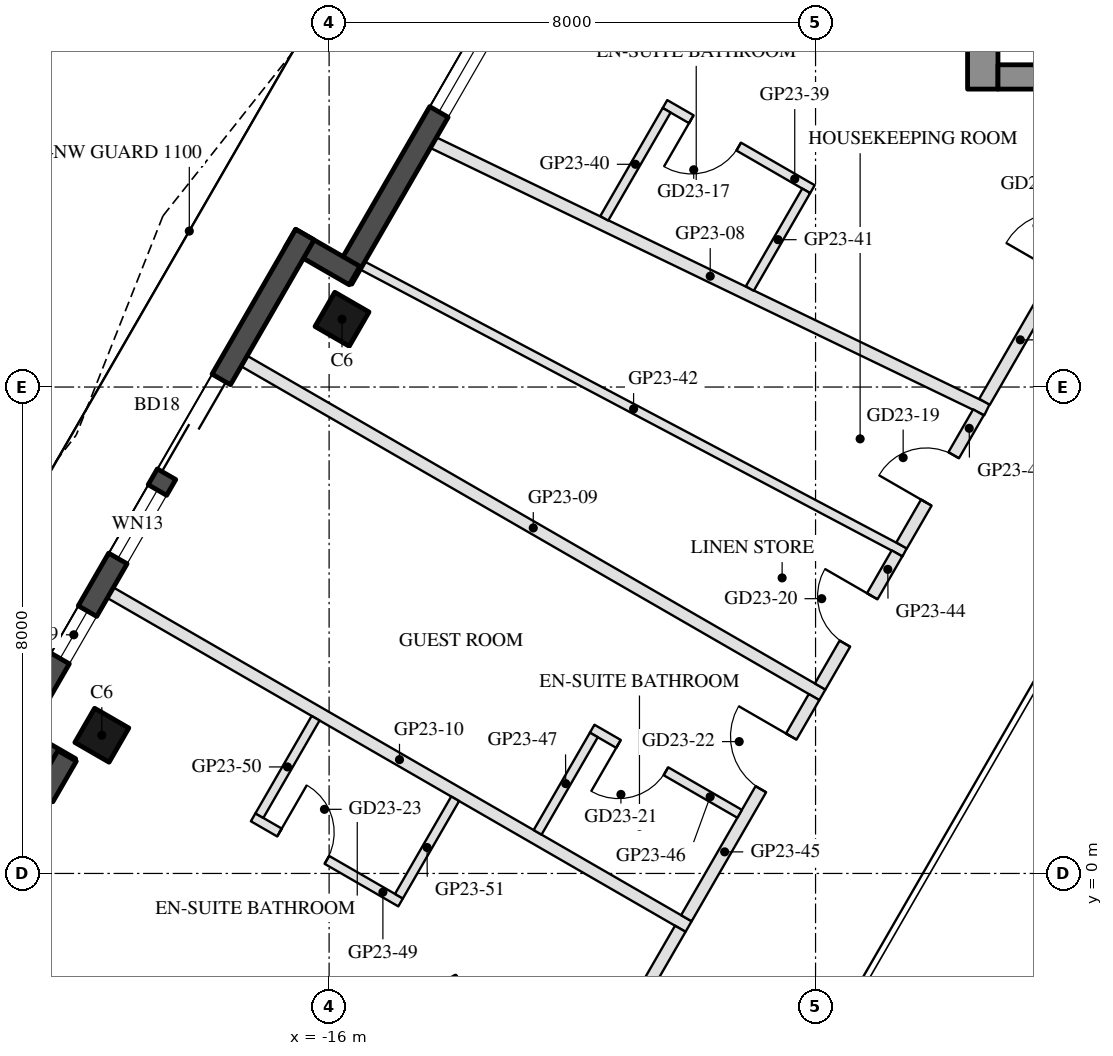
"""IFC4 building model, lengths in metres.
Left out: names, types, materials, properties, quantities, classifications, styles, units other than length and angle.
Written with IfcOpenShell. Run it as: python <this file> out.ifc"""

import sys

from ifc_helpers import new_model, si_unit, direction, frame, frame_2d, origin, origin_2d, place, context, subcontext, project, spatial, rectangle, hollow_rectangle, extrude, boolean, halfspace, element, fill, save


model = new_model("IFC4")
c1 = context("Model", 3, precision=1e-05, world=origin(), true_north=direction((0.0, 1.0)))
c2 = subcontext(c1, "Body", "Model", "MODEL_VIEW")
j1 = project(units=[si_unit("LENGTHUNIT", "METRE"), si_unit("PLANEANGLEUNIT", "RADIAN")], contexts=[c1])
p1 = place(None, origin())
s1 = spatial("IfcSite", under=j1, at=p1, CompositionType="ELEMENT")
p2 = place(p1, origin())
s2 = spatial("IfcBuilding", under=s1, at=p2, CompositionType="ELEMENT")
p3 = place(p2, frame((0.0, 0.0, 250.4)))
s3 = spatial("IfcBuildingStorey", under=s2, at=p3, CompositionType="ELEMENT", Elevation=250.4)
p4 = place(p3, frame((-15.788, 9.115, 0.0), z_axis=(0.0, 0.0, 1.0), x_axis=(0.5, 0.866025403784, 0.0)))
e1 = element("IfcColumn", 1, at=p4, inside=s3, PredefinedType="COLUMN", context=c2, shape_type="SweptSolid", body=[
    boolean("DIFFERENCE", extrude(hollow_rectangle(XDim=0.65, YDim=0.65, WallThickness=0.03, at=origin_2d()), origin(), (0.0, 0.0, 1.0), 3.7), halfspace(frame((0.0, 0.0, 3.663), z_axis=(0.0, 0.0, 1.0), x_axis=(1.0, 0.0, 0.0)), False)),
])
p5 = place(p3, frame((-19.738, 2.273, 0.0), z_axis=(0.0, 0.0, 1.0), x_axis=(0.5, 0.866025403784, 0.0)))
e2 = element("IfcColumn", 2, at=p5, inside=s3, PredefinedType="COLUMN", context=c2, shape_type="SweptSolid", body=[
    boolean("DIFFERENCE", extrude(hollow_rectangle(XDim=0.65, YDim=0.65, WallThickness=0.03, at=origin_2d()), origin(), (0.0, 0.0, 1.0), 3.7), halfspace(frame((0.0, 0.0, 3.66), z_axis=(0.0, 0.0, 1.0), x_axis=(1.0, 0.0, 0.0)), False)),
])
p6 = place(p3, frame((-12.409, 15.617, 0.0), z_axis=(0.0, 0.0, 1.0), x_axis=(-0.500003597184, -0.866023326939, 0.0)))
e3 = element("IfcWall", 3, at=p6, inside=s3, PredefinedType="SOLIDWALL", context=c2, shape_type="SweptSolid", body=[
    extrude(rectangle(XDim=6.74, YDim=0.35, at=frame_2d((3.37, 0.0))), origin(), (0.0, 0.0, 1.0), 3.55),
])
p7 = place(p6, frame((0.77, 0.0, 0.3)))
e4 = element("IfcOpeningElement", 4, at=p7, cuts=e3, PredefinedType="OPENING", context=c2, shape_type="SweptSolid", body=[
    extrude(rectangle(XDim=2.8, YDim=2.65, at=frame_2d((1.4, 1.325))), frame((0.0, 0.185, 0.0), z_axis=(0.0, -1.0, 0.0), x_axis=(1.0, 0.0, 0.0)), (0.0, 0.0, 1.0), 0.37),
])
p8 = place(p3, frame((-15.581, 9.833, 0.0), z_axis=(0.0, 0.0, 1.0), x_axis=(-0.866055662726, 0.499947586314, 0.0)))
e5 = element("IfcWall", 5, at=p8, inside=s3, PredefinedType="SOLIDWALL", context=c2, shape_type="SweptSolid", body=[
    extrude(rectangle(XDim=1.22, YDim=0.35, at=frame_2d((0.61, 0.0))), origin(), (0.0, 0.0, 1.0), 3.55),
])
p9 = place(p3, frame((-16.398, 10.507, 0.0), z_axis=(0.0, 0.0, 1.0), x_axis=(-0.499999142773, -0.866025898704, 0.0)))
e6 = element("IfcWall", 6, at=p9, inside=s3, PredefinedType="SOLIDWALL", context=c2, shape_type="SweptSolid", body=[
    extrude(rectangle(XDim=9.7, YDim=0.35, at=frame_2d((4.85, 0.0))), origin(), (0.0, 0.0, 1.0), 3.55),
])
p10 = place(p9, frame((2.75, 0.0, 0.0)))
e7 = element("IfcOpeningElement", 7, at=p10, cuts=e6, PredefinedType="OPENING", context=c2, shape_type="SweptSolid", body=[
    extrude(rectangle(XDim=1.8, YDim=2.4, at=frame_2d((0.9, 1.2))), frame((0.0, 0.185, 0.0), z_axis=(0.0, -1.0, 0.0), x_axis=(1.0, 0.0, 0.0)), (0.0, 0.0, 1.0), 0.37),
])
p11 = place(p9, frame((4.85, 0.0, 0.3)))
e8 = element("IfcOpeningElement", 8, at=p11, cuts=e6, PredefinedType="OPENING", context=c2, shape_type="SweptSolid", body=[
    extrude(rectangle(XDim=1.3, YDim=2.65, at=frame_2d((0.65, 1.325))), frame((0.0, 0.185, 0.0), z_axis=(0.0, -1.0, 0.0), x_axis=(1.0, 0.0, 0.0)), (0.0, 0.0, 1.0), 0.37),
])
p12 = place(p9, frame((7.15, 0.0, 0.3)))
e9 = element("IfcOpeningElement", 9, at=p12, cuts=e6, PredefinedType="OPENING", context=c2, shape_type="SweptSolid", body=[
    extrude(rectangle(XDim=0.9, YDim=2.65, at=frame_2d((0.45, 1.325))), frame((0.0, 0.185, 0.0), z_axis=(0.0, -1.0, 0.0), x_axis=(1.0, 0.0, 0.0)), (0.0, 0.0, 1.0), 0.37),
])
p13 = place(p3, frame((-21.312, 2.346, 0.0), z_axis=(0.0, 0.0, 1.0), x_axis=(0.866005645448, -0.500034220881, 0.0)))
e10 = element("IfcWall", 10, at=p13, inside=s3, PredefinedType="SOLIDWALL", context=c2, shape_type="SweptSolid", body=[
    extrude(rectangle(XDim=1.22, YDim=0.35, at=frame_2d((0.61, 0.0))), origin(), (0.0, 0.0, 1.0), 3.55),
])
p14 = place(p3, frame((-20.309, 1.934, 0.0), z_axis=(0.0, 0.0, 1.0), x_axis=(-0.499992114976, -0.866029956157, 0.0)))
e11 = element("IfcWall", 11, at=p14, inside=s3, PredefinedType="SOLIDWALL", context=c2, shape_type="SweptSolid", body=[
    extrude(rectangle(XDim=6.74, YDim=0.35, at=frame_2d((3.37, 0.0))), origin(), (0.0, 0.0, 1.0), 3.55),
])
p15 = place(p14, frame((4.02, 0.0, 0.0)))
e12 = element("IfcOpeningElement", 12, at=p15, cuts=e11, PredefinedType="OPENING", context=c2, shape_type="SweptSolid", body=[
    extrude(rectangle(XDim=2.4, YDim=2.4, at=frame_2d((1.2, 1.2))), frame((0.0, 0.185, 0.0), z_axis=(0.0, -1.0, 0.0), x_axis=(1.0, 0.0, 0.0)), (0.0, 0.0, 1.0), 0.37),
])
p16 = place(p14, frame((0.77, 0.0, 0.3)))
e13 = element("IfcOpeningElement", 13, at=p16, cuts=e11, PredefinedType="OPENING", context=c2, shape_type="SweptSolid", body=[
    extrude(rectangle(XDim=2.9, YDim=2.65, at=frame_2d((1.45, 1.325))), frame((0.0, 0.185, 0.0), z_axis=(0.0, -1.0, 0.0), x_axis=(1.0, 0.0, 0.0)), (0.0, 0.0, 1.0), 0.37),
])
p17 = place(p3, frame((-5.25, 12.9, 0.0), z_axis=(0.0, 0.0, 1.0), x_axis=(0.0, 1.0, 0.0)))
e14 = element("IfcWall", 14, at=p17, inside=s3, PredefinedType="SHEAR", context=c2, shape_type="SweptSolid", body=[
    extrude(rectangle(XDim=14.837, YDim=0.5, at=frame_2d((7.418, 0.0))), origin(), (0.0, 0.0, 1.0), 3.5),
])
p18 = place(p3, frame((5.0, 13.1, 0.0), z_axis=(0.0, 0.0, 1.0), x_axis=(-1.0, 0.0, 0.0)))
e15 = element("IfcWall", 15, at=p18, inside=s3, PredefinedType="SHEAR", context=c2, shape_type="SweptSolid", body=[
    extrude(rectangle(XDim=10.0, YDim=0.4, at=frame_2d((5.0, 0.0))), origin(), (0.0, 0.0, 1.0), 3.5),
])
p19 = place(p18, frame((3.55, 0.0, 0.0)))
e16 = element("IfcOpeningElement", 16, at=p19, cuts=e15, PredefinedType="OPENING", context=c2, shape_type="SweptSolid", body=[
    extrude(rectangle(XDim=1.1, YDim=2.1, at=frame_2d((0.55, 1.05))), frame((0.0, 0.21, 0.0), z_axis=(0.0, -1.0, 0.0), x_axis=(1.0, 0.0, 0.0)), (0.0, 0.0, 1.0), 0.42),
])
p20 = place(p18, frame((5.85, 0.0, 0.0)))
e17 = element("IfcOpeningElement", 17, at=p20, cuts=e15, PredefinedType="OPENING", context=c2, shape_type="SweptSolid", body=[
    extrude(rectangle(XDim=1.4, YDim=2.1, at=frame_2d((0.7, 1.05))), frame((0.0, 0.21, 0.0), z_axis=(0.0, -1.0, 0.0), x_axis=(1.0, 0.0, 0.0)), (0.0, 0.0, 1.0), 0.42),
])
p21 = place(p3, frame((-14.284, 12.019, 0.0), z_axis=(0.0, 0.0, 1.0), x_axis=(0.90065661155, -0.434531550144, 0.0)))
e18 = element("IfcWall", 18, at=p21, inside=s3, PredefinedType="PARTITIONING", context=c2, shape_type="SweptSolid", body=[
    extrude(rectangle(XDim=10.108, YDim=0.2, at=frame_2d((5.054, 0.0))), origin(), (0.0, 0.0, 1.0), 2.95),
])
for number, where, z_axis, x_axis in (
    (19, (-17.397, 8.427, 0.0), (0.0, 0.0, 1.0), (0.866, -0.5, 0.0)),
    (20, (-19.597, 4.617, 0.0), (0.0, 0.0, 1.0), (0.866, -0.5, 0.0)),
):
    element("IfcWall", number, at=place(p3, frame(where, z_axis=z_axis, x_axis=x_axis)), inside=s3, PredefinedType="PARTITIONING", context=c2, shape_type="SweptSolid", body=[
        extrude(rectangle(XDim=10.98, YDim=0.2, at=frame_2d((5.49, 0.0))), origin(), (0.0, 0.0, 1.0), 3.1),
    ])
p22 = place(p3, frame((-5.221, 7.757, 0.0), z_axis=(0.0, 0.0, 1.0), x_axis=(0.49998360248, 0.86603487069, 0.0)))
e21 = element("IfcWall", 21, at=p22, inside=s3, PredefinedType="PARTITIONING", context=c2, shape_type="SweptSolid", body=[
    extrude(rectangle(XDim=5.881, YDim=0.2, at=frame_2d((2.94, 0.0))), origin(), (0.0, 0.0, 1.0), 2.95),
])
p23 = place(p22, frame((2.44, 0.0, 0.0)))
e22 = element("IfcOpeningElement", 22, at=p23, cuts=e21, PredefinedType="OPENING", context=c2, shape_type="SweptSolid", body=[
    extrude(rectangle(XDim=1.0, YDim=2.1, at=frame_2d((0.5, 1.05))), frame((0.0, 0.11, 0.0), z_axis=(0.0, -1.0, 0.0), x_axis=(1.0, 0.0, 0.0)), (0.0, 0.0, 1.0), 0.22),
])
p24 = place(p3, frame((-8.052, 11.254, 0.0), z_axis=(0.0, 0.0, 1.0), x_axis=(-0.865996816683, 0.500049511043, 0.0)))
e23 = element("IfcWall", 23, at=p24, inside=s3, PredefinedType="PARTITIONING", context=c2, shape_type="SweptSolid", body=[
    extrude(rectangle(XDim=2.8, YDim=0.15, at=frame_2d((1.4, 0.0))), origin(), (0.0, 0.0, 1.0), 3.55),
])
p25 = place(p24, frame((1.4, 0.0, 0.0)))
e24 = element("IfcOpeningElement", 24, at=p25, cuts=e23, PredefinedType="OPENING", context=c2, shape_type="SweptSolid", body=[
    extrude(rectangle(XDim=0.9, YDim=2.1, at=frame_2d((0.45, 1.05))), frame((0.0, 0.085, 0.0), z_axis=(0.0, -1.0, 0.0), x_axis=(1.0, 0.0, 0.0)), (0.0, 0.0, 1.0), 0.17),
])
p26 = place(p3, frame((-10.449, 12.552, 0.0), z_axis=(0.0, 0.0, 1.0), x_axis=(-0.500041704412, -0.866001324392, 0.0)))
e25 = element("IfcWall", 25, at=p26, inside=s3, PredefinedType="PARTITIONING", context=c2, shape_type="SweptSolid", body=[
    extrude(rectangle(XDim=2.052, YDim=0.15, at=frame_2d((1.026, 0.0))), origin(), (0.0, 0.0, 1.0), 2.95),
])
p27 = place(p3, frame((-8.154, 11.227, 0.0), z_axis=(0.0, 0.0, 1.0), x_axis=(-0.500086883948, -0.865975235502, 0.0)))
e26 = element("IfcWall", 26, at=p27, inside=s3, PredefinedType="PARTITIONING", context=c2, shape_type="SweptSolid", body=[
    extrude(rectangle(XDim=1.856, YDim=0.15, at=frame_2d((0.928, 0.0))), origin(), (0.0, 0.0, 1.0), 2.95),
])
p28 = place(p3, frame((-15.451, 9.998, 0.0), z_axis=(0.0, 0.0, 1.0), x_axis=(0.883969770247, -0.467544057058, 0.0)))
e27 = element("IfcWall", 27, at=p28, inside=s3, PredefinedType="PARTITIONING", context=c2, shape_type="SweptSolid", body=[
    extrude(rectangle(XDim=10.087, YDim=0.15, at=frame_2d((5.043, 0.0))), origin(), (0.0, 0.0, 1.0), 3.1),
])
p29 = place(p3, frame((-6.585, 5.394, 0.0), z_axis=(0.0, 0.0, 1.0), x_axis=(0.499981564561, 0.866036047228, 0.0)))
e28 = element("IfcWall", 28, at=p29, inside=s3, PredefinedType="PARTITIONING", context=c2, shape_type="SweptSolid", body=[
    extrude(rectangle(XDim=2.528, YDim=0.2, at=frame_2d((1.264, 0.0))), origin(), (0.0, 0.0, 1.0), 2.95),
])
p30 = place(p29, frame((0.814, 0.0, 0.0)))
e29 = element("IfcOpeningElement", 29, at=p30, cuts=e28, PredefinedType="OPENING", context=c2, shape_type="SweptSolid", body=[
    extrude(rectangle(XDim=0.9, YDim=2.1, at=frame_2d((0.45, 1.05))), frame((0.0, 0.11, 0.0), z_axis=(0.0, -1.0, 0.0), x_axis=(1.0, 0.0, 0.0)), (0.0, 0.0, 1.0), 0.22),
])
p31 = place(p3, frame((-7.925, 3.074, 0.0), z_axis=(0.0, 0.0, 1.0), x_axis=(0.499939757307, 0.866060182126, 0.0)))
e30 = element("IfcWall", 30, at=p31, inside=s3, PredefinedType="PARTITIONING", context=c2, shape_type="SweptSolid", body=[
    extrude(rectangle(XDim=2.529, YDim=0.2, at=frame_2d((1.264, 0.0))), origin(), (0.0, 0.0, 1.0), 2.95),
])
p32 = place(p31, frame((0.814, 0.0, 0.0)))
e31 = element("IfcOpeningElement", 31, at=p32, cuts=e30, PredefinedType="OPENING", context=c2, shape_type="SweptSolid", body=[
    extrude(rectangle(XDim=0.9, YDim=2.1, at=frame_2d((0.45, 1.05))), frame((0.0, 0.11, 0.0), z_axis=(0.0, -1.0, 0.0), x_axis=(1.0, 0.0, 0.0)), (0.0, 0.0, 1.0), 0.22),
])
p33 = place(p3, frame((-10.125, -0.736, 0.0), z_axis=(0.0, 0.0, 1.0), x_axis=(0.49998411664, 0.866034573852, 0.0)))
e32 = element("IfcWall", 32, at=p33, inside=s3, PredefinedType="PARTITIONING", context=c2, shape_type="SweptSolid", body=[
    extrude(rectangle(XDim=4.2, YDim=0.2, at=frame_2d((2.1, 0.0))), origin(), (0.0, 0.0, 1.0), 2.95),
])
p34 = place(p33, frame((2.45, 0.0, 0.0)))
e33 = element("IfcOpeningElement", 33, at=p34, cuts=e32, PredefinedType="OPENING", context=c2, shape_type="SweptSolid", body=[
    extrude(rectangle(XDim=1.0, YDim=2.1, at=frame_2d((0.5, 1.05))), frame((0.0, 0.11, 0.0), z_axis=(0.0, -1.0, 0.0), x_axis=(1.0, 0.0, 0.0)), (0.0, 0.0, 1.0), 0.22),
])
p35 = place(p3, frame((-9.249, 0.981, 0.0), z_axis=(0.0, 0.0, 1.0), x_axis=(-0.865996816683, 0.500049511043, 0.0)))
e34 = element("IfcWall", 34, at=p35, inside=s3, PredefinedType="PARTITIONING", context=c2, shape_type="SweptSolid", body=[
    extrude(rectangle(XDim=2.8, YDim=0.15, at=frame_2d((1.4, 0.0))), origin(), (0.0, 0.0, 1.0), 2.95),
])
p36 = place(p35, frame((1.4, 0.0, 0.0)))
e35 = element("IfcOpeningElement", 35, at=p36, cuts=e34, PredefinedType="OPENING", context=c2, shape_type="SweptSolid", body=[
    extrude(rectangle(XDim=0.9, YDim=2.1, at=frame_2d((0.45, 1.05))), frame((0.0, 0.085, 0.0), z_axis=(0.0, -1.0, 0.0), x_axis=(1.0, 0.0, 0.0)), (0.0, 0.0, 1.0), 0.17),
])
p37 = place(p3, frame((-11.646, 2.278, 0.0), z_axis=(0.0, 0.0, 1.0), x_axis=(-0.500042316284, -0.866000971088, 0.0)))
e36 = element("IfcWall", 36, at=p37, inside=s3, PredefinedType="PARTITIONING", context=c2, shape_type="SweptSolid", body=[
    extrude(rectangle(XDim=1.85, YDim=0.15, at=frame_2d((0.925, 0.0))), origin(), (0.0, 0.0, 1.0), 2.95),
])
p38 = place(p3, frame((-12.269, -4.45, 0.0), z_axis=(0.0, 0.0, 1.0), x_axis=(0.500011931275, 0.86601851515, 0.0)))
e37 = element("IfcWall", 37, at=p38, inside=s3, PredefinedType="PARTITIONING", context=c2, shape_type="SweptSolid", body=[
    extrude(rectangle(XDim=4.088, YDim=0.2, at=frame_2d((2.044, 0.0))), origin(), (0.0, 0.0, 1.0), 2.95),
])
p39 = place(p38, frame((1.544, 0.0, 0.0)))
e38 = element("IfcOpeningElement", 38, at=p39, cuts=e37, PredefinedType="OPENING", context=c2, shape_type="SweptSolid", body=[
    extrude(rectangle(XDim=1.0, YDim=2.1, at=frame_2d((0.5, 1.05))), frame((0.0, 0.11, 0.0), z_axis=(0.0, -1.0, 0.0), x_axis=(1.0, 0.0, 0.0)), (0.0, 0.0, 1.0), 0.22),
])
p40 = place(p3, frame((-17.249, 0.923, 0.0), z_axis=(0.0, 0.0, 1.0), x_axis=(0.866034573852, -0.49998411664, 0.0)))
e39 = element("IfcWall", 39, at=p40, inside=s3, PredefinedType="PARTITIONING", context=c2, shape_type="SweptSolid", body=[
    extrude(rectangle(XDim=2.8, YDim=0.15, at=frame_2d((1.4, 0.0))), origin(), (0.0, 0.0, 1.0), 2.95),
])
p41 = place(p40, frame((0.5, 0.0, 0.0)))
e40 = element("IfcOpeningElement", 40, at=p41, cuts=e39, PredefinedType="OPENING", context=c2, shape_type="SweptSolid", body=[
    extrude(rectangle(XDim=0.9, YDim=2.1, at=frame_2d((0.45, 1.05))), frame((0.0, 0.085, 0.0), z_axis=(0.0, -1.0, 0.0), x_axis=(1.0, 0.0, 0.0)), (0.0, 0.0, 1.0), 0.17),
])
for number, where, z_axis, x_axis in (
    (41, (-16.222, 2.553, 0.0), (0.0, 0.0, 1.0), (-0.5, -0.866, 0.0)),
    (42, (-13.927, 1.228, 0.0), (0.0, 0.0, 1.0), (-0.5, -0.866, 0.0)),
):
    element("IfcWall", number, at=place(p3, frame(where, z_axis=z_axis, x_axis=x_axis)), inside=s3, PredefinedType="PARTITIONING", context=c2, shape_type="SweptSolid", body=[
        extrude(rectangle(XDim=1.85, YDim=0.15, at=frame_2d((0.925, 0.0))), origin(), (0.0, 0.0, 1.0), 3.55),
    ])
p42 = place(p7, origin())
e43 = element("IfcWindow", 43, at=p42, inside=s3, PartitioningType="SINGLE_PANEL", PredefinedType="WINDOW", context=c2, shape_type="SweptSolid", body=[
    extrude(rectangle(XDim=2.8, YDim=2.65, at=frame_2d((1.4, 1.325))), frame((0.0, 0.03, 0.0), z_axis=(0.0, -1.0, 0.0), x_axis=(1.0, 0.0, 0.0)), (0.0, 0.0, 1.0), 0.06),
])
fill(e4, e43)
p43 = place(p10, frame((1.8, 0.0, 0.0), z_axis=(0.0, 0.0, 1.0), x_axis=(-1.0, 0.0, 0.0)))
e44 = element("IfcDoor", 44, at=p43, inside=s3, OperationType="SLIDING_TO_LEFT", PredefinedType="DOOR", context=c2, shape_type="SweptSolid", body=[
    extrude(rectangle(XDim=1.8, YDim=2.4, at=frame_2d((0.9, 1.2))), frame((0.0, 0.025, 0.0), z_axis=(0.0, -1.0, 0.0), x_axis=(1.0, 0.0, 0.0)), (0.0, 0.0, 1.0), 0.05),
])
fill(e7, e44)
p44 = place(p11, origin())
e45 = element("IfcWindow", 45, at=p44, inside=s3, PartitioningType="SINGLE_PANEL", PredefinedType="WINDOW", context=c2, shape_type="SweptSolid", body=[
    extrude(rectangle(XDim=1.3, YDim=2.65, at=frame_2d((0.65, 1.325))), frame((0.0, 0.03, 0.0), z_axis=(0.0, -1.0, 0.0), x_axis=(1.0, 0.0, 0.0)), (0.0, 0.0, 1.0), 0.06),
])
fill(e8, e45)
p45 = place(p12, origin())
e46 = element("IfcWindow", 46, at=p45, inside=s3, PartitioningType="SINGLE_PANEL", PredefinedType="WINDOW", context=c2, shape_type="SweptSolid", body=[
    extrude(rectangle(XDim=0.9, YDim=2.65, at=frame_2d((0.45, 1.325))), frame((0.0, 0.03, 0.0), z_axis=(0.0, -1.0, 0.0), x_axis=(1.0, 0.0, 0.0)), (0.0, 0.0, 1.0), 0.06),
])
fill(e9, e46)
p46 = place(p25, origin())
e47 = element("IfcDoor", 47, at=p46, inside=s3, OperationType="SINGLE_SWING_RIGHT", PredefinedType="DOOR", context=c2, shape_type="SweptSolid", body=[
    extrude(rectangle(XDim=0.9, YDim=2.1, at=frame_2d((0.45, 1.05))), frame((0.0, 0.025, 0.0), z_axis=(0.0, -1.0, 0.0), x_axis=(1.0, 0.0, 0.0)), (0.0, 0.0, 1.0), 0.05),
])
fill(e24, e47)
p47 = place(p30, origin())
e48 = element("IfcDoor", 48, at=p47, inside=s3, OperationType="SINGLE_SWING_LEFT", PredefinedType="DOOR", context=c2, shape_type="SweptSolid", body=[
    extrude(rectangle(XDim=0.9, YDim=2.1, at=frame_2d((0.45, 1.05))), frame((0.0, 0.025, 0.0), z_axis=(0.0, -1.0, 0.0), x_axis=(1.0, 0.0, 0.0)), (0.0, 0.0, 1.0), 0.05),
])
fill(e29, e48)
p48 = place(p32, origin())
e49 = element("IfcDoor", 49, at=p48, inside=s3, OperationType="SINGLE_SWING_RIGHT", PredefinedType="DOOR", context=c2, shape_type="SweptSolid", body=[
    extrude(rectangle(XDim=0.9, YDim=2.1, at=frame_2d((0.45, 1.05))), frame((0.0, 0.025, 0.0), z_axis=(0.0, -1.0, 0.0), x_axis=(1.0, 0.0, 0.0)), (0.0, 0.0, 1.0), 0.05),
])
fill(e31, e49)
p49 = place(p36, origin())
e50 = element("IfcDoor", 50, at=p49, inside=s3, OperationType="SINGLE_SWING_RIGHT", PredefinedType="DOOR", context=c2, shape_type="SweptSolid", body=[
    extrude(rectangle(XDim=0.9, YDim=2.1, at=frame_2d((0.45, 1.05))), frame((0.0, 0.025, 0.0), z_axis=(0.0, -1.0, 0.0), x_axis=(1.0, 0.0, 0.0)), (0.0, 0.0, 1.0), 0.05),
])
fill(e35, e50)
p50 = place(p34, origin())
e51 = element("IfcDoor", 51, at=p50, inside=s3, OperationType="SINGLE_SWING_RIGHT", PredefinedType="DOOR", context=c2, shape_type="SweptSolid", body=[
    extrude(rectangle(XDim=1.0, YDim=2.1, at=frame_2d((0.5, 1.05))), frame((0.0, 0.025, 0.0), z_axis=(0.0, -1.0, 0.0), x_axis=(1.0, 0.0, 0.0)), (0.0, 0.0, 1.0), 0.05),
])
fill(e33, e51)
p51 = place(p41, origin())
e52 = element("IfcDoor", 52, at=p51, inside=s3, OperationType="SINGLE_SWING_LEFT", PredefinedType="DOOR", context=c2, shape_type="SweptSolid", body=[
    extrude(rectangle(XDim=0.9, YDim=2.1, at=frame_2d((0.45, 1.05))), frame((0.0, 0.025, 0.0), z_axis=(0.0, -1.0, 0.0), x_axis=(1.0, 0.0, 0.0)), (0.0, 0.0, 1.0), 0.05),
])
fill(e40, e52)
save(model, sys.argv[1])
